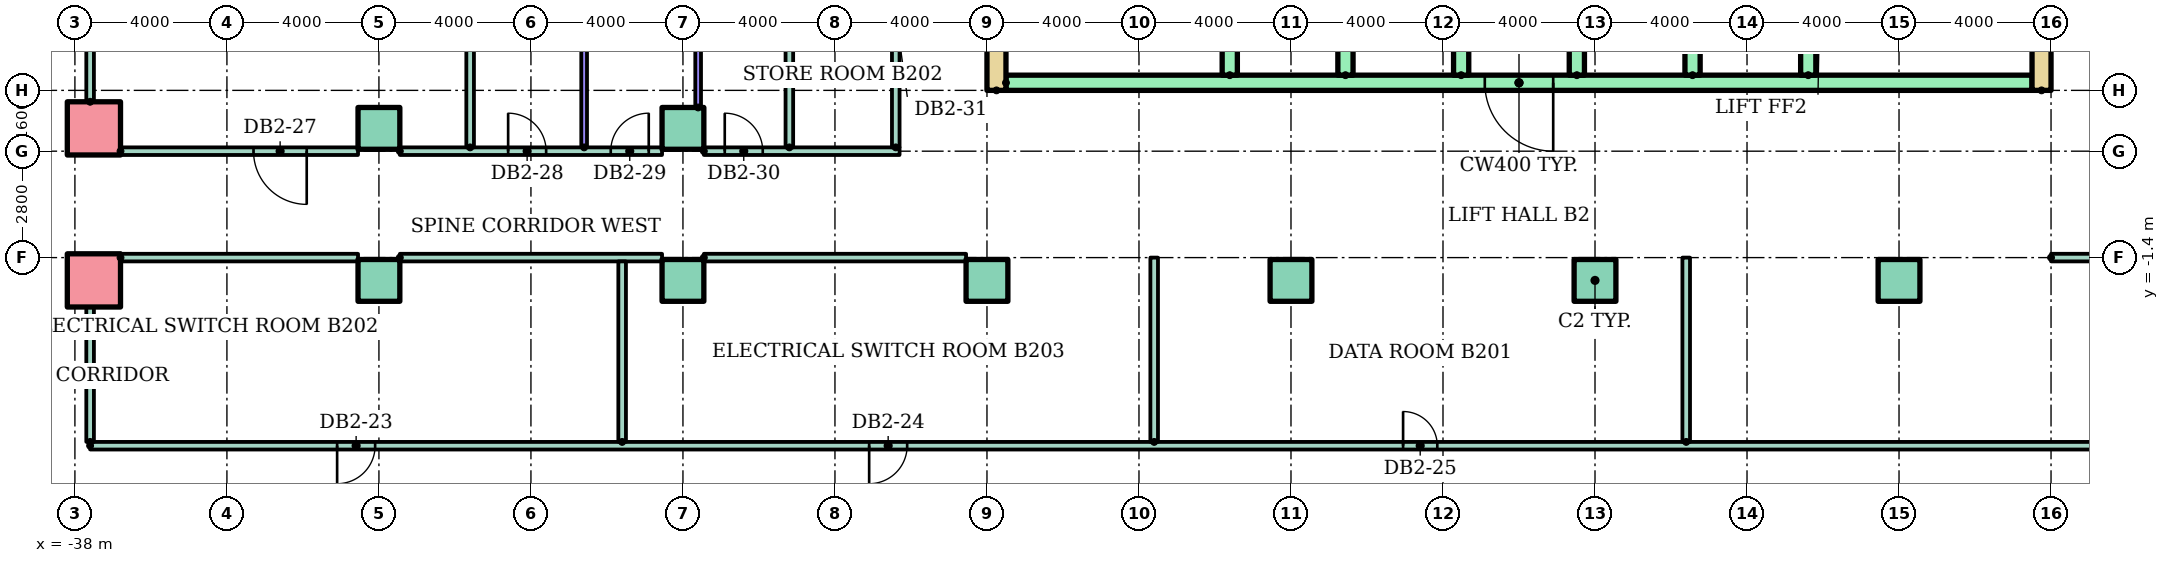
"""IFC4 building model, lengths in metres.
Left out: names, types, materials, properties, quantities, classifications, styles, units other than length and angle.
Written with IfcOpenShell. Run it as: python <this file> out.ifc"""

import sys

from ifc_helpers import new_model, si_unit, direction, frame, frame_2d, origin, origin_2d, place, context, subcontext, project, spatial, rectangle, hollow_rectangle, extrude, element, fill, save


model = new_model("IFC4")
c1 = context("Model", 3, precision=1e-05, world=origin(), true_north=direction((0.0, 1.0)))
c2 = subcontext(c1, "Body", "Model", "MODEL_VIEW")
j1 = project(units=[si_unit("LENGTHUNIT", "METRE"), si_unit("PLANEANGLEUNIT", "RADIAN")], contexts=[c1])
p1 = place(None, origin())
s1 = spatial("IfcSite", under=j1, at=p1, CompositionType="ELEMENT")
p2 = place(p1, origin())
s2 = spatial("IfcBuilding", under=s1, at=p2, CompositionType="ELEMENT")
p3 = place(p2, frame((0.0, 0.0, -10.0)))
s3 = spatial("IfcBuildingStorey", under=s2, at=p3, CompositionType="ELEMENT", Elevation=-10.0)
p4 = place(p3, frame((-37.5, -2.0, -0.3)))
e1 = element("IfcColumn", 1, at=p4, inside=s3, PredefinedType="COLUMN", context=c2, shape_type="SweptSolid", body=[
    extrude(hollow_rectangle(XDim=1.4, YDim=1.4, WallThickness=0.08, at=origin_2d()), origin(), (0.0, 0.0, 1.0), 5.3),
])
for number, where in (
    (2, (-30.0, -2.0, -0.3)),
    (3, (-22.0, -2.0, -0.3)),
    (4, (-14.0, -2.0, -0.3)),
    (5, (-6.0, -2.0, -0.3)),
    (6, (2.0, -2.0, -0.3)),
    (7, (10.0, -2.0, -0.3)),
):
    element("IfcColumn", number, at=place(p3, frame(where)), inside=s3, PredefinedType="COLUMN", context=c2, shape_type="SweptSolid", body=[
        extrude(rectangle(XDim=1.1, YDim=1.1, at=origin_2d()), origin(), (0.0, 0.0, 1.0), 5.3),
    ])
p5 = place(p3, frame((-37.5, 2.0, -0.3)))
e8 = element("IfcColumn", 8, at=p5, inside=s3, PredefinedType="COLUMN", context=c2, shape_type="SweptSolid", body=[
    extrude(hollow_rectangle(XDim=1.4, YDim=1.4, WallThickness=0.08, at=origin_2d()), origin(), (0.0, 0.0, 1.0), 5.3),
])
for number, where in (
    (9, (-30.0, 2.0, -0.3)),
    (10, (-22.0, 2.0, -0.3)),
):
    element("IfcColumn", number, at=place(p3, frame(where)), inside=s3, PredefinedType="COLUMN", context=c2, shape_type="SweptSolid", body=[
        extrude(rectangle(XDim=1.1, YDim=1.1, at=origin_2d()), origin(), (0.0, 0.0, 1.0), 5.3),
    ])
for number, where, z_axis, x_axis in (
    (11, (-13.75, 3.0, 0.0), (0.0, 0.0, 1.0), (0.0, 1.0, 0.0)),
    (12, (13.75, 3.0, 0.0), (0.0, 0.0, 1.0), (0.0, 1.0, 0.0)),
):
    element("IfcWall", number, at=place(p3, frame(where, z_axis=z_axis, x_axis=x_axis)), inside=s3, PredefinedType="SHEAR", context=c2, shape_type="SweptSolid", body=[
        extrude(rectangle(XDim=17.4, YDim=0.5, at=frame_2d((8.7, 0.0))), origin(), (0.0, 0.0, 1.0), 4.65),
    ])
p6 = place(p3, frame((-13.5, 3.2, 0.0)))
e13 = element("IfcWall", 13, at=p6, inside=s3, PredefinedType="SHEAR", context=c2, shape_type="SweptSolid", body=[
    extrude(rectangle(XDim=27.0, YDim=0.4, at=frame_2d((13.5, 0.0))), origin(), (0.0, 0.0, 1.0), 4.65),
])
p7 = place(p6, frame((12.6, 0.0, 0.0)))
e14 = element("IfcOpeningElement", 14, at=p7, cuts=e13, PredefinedType="OPENING", context=c2, shape_type="SweptSolid", body=[
    extrude(rectangle(XDim=1.8, YDim=2.1, at=frame_2d((0.9, 1.05))), frame((0.0, 0.21, 0.0), z_axis=(0.0, -1.0, 0.0), x_axis=(1.0, 0.0, 0.0)), (0.0, 0.0, 1.0), 0.42),
])
for number, where, z_axis, x_axis in (
    (15, (-7.611, 3.4, 0.0), (0.0, 0.0, 1.0), (0.0, 1.0, 0.0)),
    (16, (-4.567, 3.4, 0.0), (0.0, 0.0, 1.0), (0.0, 1.0, 0.0)),
    (17, (-1.522, 3.4, 0.0), (0.0, 0.0, 1.0), (0.0, 1.0, 0.0)),
    (18, (1.522, 3.4, 0.0), (0.0, 0.0, 1.0), (0.0, 1.0, 0.0)),
    (19, (4.567, 3.4, 0.0), (0.0, 0.0, 1.0), (0.0, 1.0, 0.0)),
    (20, (7.611, 3.4, 0.0), (0.0, 0.0, 1.0), (0.0, 1.0, 0.0)),
):
    element("IfcWall", number, at=place(p3, frame(where, z_axis=z_axis, x_axis=x_axis)), inside=s3, PredefinedType="SHEAR", context=c2, shape_type="SweptSolid", body=[
        extrude(rectangle(XDim=3.0, YDim=0.4, at=frame_2d((1.5, 0.0))), origin(), (0.0, 0.0, 1.0), 4.65),
    ])
p8 = place(p3, frame((-37.6, -6.35, 0.0)))
e21 = element("IfcWall", 21, at=p8, inside=s3, PredefinedType="PARTITIONING", context=c2, shape_type="SweptSolid", body=[
    extrude(rectangle(XDim=75.2, YDim=0.2, at=frame_2d((37.6, 0.0))), origin(), (0.0, 0.0, 1.0), 4.65),
])
p9 = place(p8, frame((6.5, 0.0, 0.0)))
e22 = element("IfcOpeningElement", 22, at=p9, cuts=e21, PredefinedType="OPENING", context=c2, shape_type="SweptSolid", body=[
    extrude(rectangle(XDim=1.0, YDim=2.1, at=frame_2d((0.5, 1.05))), frame((0.0, 0.11, 0.0), z_axis=(0.0, -1.0, 0.0), x_axis=(1.0, 0.0, 0.0)), (0.0, 0.0, 1.0), 0.22),
])
p10 = place(p8, frame((20.5, 0.0, 0.0)))
e23 = element("IfcOpeningElement", 23, at=p10, cuts=e21, PredefinedType="OPENING", context=c2, shape_type="SweptSolid", body=[
    extrude(rectangle(XDim=1.0, YDim=2.1, at=frame_2d((0.5, 1.05))), frame((0.0, 0.11, 0.0), z_axis=(0.0, -1.0, 0.0), x_axis=(1.0, 0.0, 0.0)), (0.0, 0.0, 1.0), 0.22),
])
p11 = place(p8, frame((34.55, 0.0, 0.0)))
e24 = element("IfcOpeningElement", 24, at=p11, cuts=e21, PredefinedType="OPENING", context=c2, shape_type="SweptSolid", body=[
    extrude(rectangle(XDim=0.9, YDim=2.1, at=frame_2d((0.45, 1.05))), frame((0.0, 0.11, 0.0), z_axis=(0.0, -1.0, 0.0), x_axis=(1.0, 0.0, 0.0)), (0.0, 0.0, 1.0), 0.22),
])
p12 = place(p8, frame((58.1, 0.0, 0.0)))
e25 = element("IfcOpeningElement", 25, at=p12, cuts=e21, PredefinedType="OPENING", context=c2, shape_type="SweptSolid", body=[
    extrude(rectangle(XDim=1.0, YDim=2.1, at=frame_2d((0.5, 1.05))), frame((0.0, 0.11, 0.0), z_axis=(0.0, -1.0, 0.0), x_axis=(1.0, 0.0, 0.0)), (0.0, 0.0, 1.0), 0.22),
])
p13 = place(p3, frame((-36.8, -1.4, 0.0)))
e26 = element("IfcWall", 26, at=p13, inside=s3, PredefinedType="PARTITIONING", context=c2, shape_type="SweptSolid", body=[
    extrude(rectangle(XDim=6.25, YDim=0.2, at=frame_2d((3.125, 0.0))), origin(), (0.0, 0.0, 1.0), 4.65),
])
for number, where in (
    (27, (-29.45, -1.4, 0.0)),
    (28, (-21.45, -1.4, 0.0)),
):
    element("IfcWall", number, at=place(p3, frame(where)), inside=s3, PredefinedType="PARTITIONING", context=c2, shape_type="SweptSolid", body=[
        extrude(rectangle(XDim=6.9, YDim=0.2, at=frame_2d((3.45, 0.0))), origin(), (0.0, 0.0, 1.0), 4.65),
    ])
p14 = place(p3, frame((14.0, -1.4, 0.0)))
e29 = element("IfcWall", 29, at=p14, inside=s3, PredefinedType="PARTITIONING", context=c2, shape_type="SweptSolid", body=[
    extrude(rectangle(XDim=3.45, YDim=0.2, at=frame_2d((1.725, 0.0))), origin(), (0.0, 0.0, 1.0), 4.65),
])
p15 = place(p3, frame((-36.8, 1.4, 0.0)))
e30 = element("IfcWall", 30, at=p15, inside=s3, PredefinedType="PARTITIONING", context=c2, shape_type="SweptSolid", body=[
    extrude(rectangle(XDim=6.25, YDim=0.2, at=frame_2d((3.125, 0.0))), origin(), (0.0, 0.0, 1.0), 4.65),
])
p16 = place(p15, frame((3.5, 0.0, 0.0)))
e31 = element("IfcOpeningElement", 31, at=p16, cuts=e30, PredefinedType="OPENING", context=c2, shape_type="SweptSolid", body=[
    extrude(rectangle(XDim=1.4, YDim=2.1, at=frame_2d((0.7, 1.05))), frame((0.0, 0.11, 0.0), z_axis=(0.0, -1.0, 0.0), x_axis=(1.0, 0.0, 0.0)), (0.0, 0.0, 1.0), 0.22),
])
p17 = place(p3, frame((-29.45, 1.4, 0.0)))
e32 = element("IfcWall", 32, at=p17, inside=s3, PredefinedType="PARTITIONING", context=c2, shape_type="SweptSolid", body=[
    extrude(rectangle(XDim=6.9, YDim=0.2, at=frame_2d((3.45, 0.0))), origin(), (0.0, 0.0, 1.0), 4.65),
])
p18 = place(p17, frame((2.85, 0.0, 0.0)))
e33 = element("IfcOpeningElement", 33, at=p18, cuts=e32, PredefinedType="OPENING", context=c2, shape_type="SweptSolid", body=[
    extrude(rectangle(XDim=1.0, YDim=2.1, at=frame_2d((0.5, 1.05))), frame((0.0, 0.11, 0.0), z_axis=(0.0, -1.0, 0.0), x_axis=(1.0, 0.0, 0.0)), (0.0, 0.0, 1.0), 0.22),
])
p19 = place(p17, frame((5.55, 0.0, 0.0)))
e34 = element("IfcOpeningElement", 34, at=p19, cuts=e32, PredefinedType="OPENING", context=c2, shape_type="SweptSolid", body=[
    extrude(rectangle(XDim=1.0, YDim=2.1, at=frame_2d((0.5, 1.05))), frame((0.0, 0.11, 0.0), z_axis=(0.0, -1.0, 0.0), x_axis=(1.0, 0.0, 0.0)), (0.0, 0.0, 1.0), 0.22),
])
p20 = place(p3, frame((-21.45, 1.4, 0.0)))
e35 = element("IfcWall", 35, at=p20, inside=s3, PredefinedType="PARTITIONING", context=c2, shape_type="SweptSolid", body=[
    extrude(rectangle(XDim=5.15, YDim=0.2, at=frame_2d((2.575, 0.0))), origin(), (0.0, 0.0, 1.0), 4.65),
])
p21 = place(p20, frame((0.55, 0.0, 0.0)))
e36 = element("IfcOpeningElement", 36, at=p21, cuts=e35, PredefinedType="OPENING", context=c2, shape_type="SweptSolid", body=[
    extrude(rectangle(XDim=1.0, YDim=2.1, at=frame_2d((0.5, 1.05))), frame((0.0, 0.11, 0.0), z_axis=(0.0, -1.0, 0.0), x_axis=(1.0, 0.0, 0.0)), (0.0, 0.0, 1.0), 0.22),
])
p22 = place(p3, frame((-37.6, -6.25, 0.0), z_axis=(0.0, 0.0, 1.0), x_axis=(0.0, 1.0, 0.0)))
e37 = element("IfcWall", 37, at=p22, inside=s3, PredefinedType="PARTITIONING", context=c2, shape_type="SweptSolid", body=[
    extrude(rectangle(XDim=3.55, YDim=0.2, at=frame_2d((1.775, 0.0))), origin(), (0.0, 0.0, 1.0), 4.65),
])
p23 = place(p3, frame((-37.6, 2.7, 0.0), z_axis=(0.0, 0.0, 1.0), x_axis=(0.0, 1.0, 0.0)))
e38 = element("IfcWall", 38, at=p23, inside=s3, PredefinedType="PARTITIONING", context=c2, shape_type="SweptSolid", body=[
    extrude(rectangle(XDim=5.8, YDim=0.2, at=frame_2d((2.9, 0.0))), origin(), (0.0, 0.0, 1.0), 4.65),
])
p24 = place(p3, frame((-27.6, 1.5, 0.0), z_axis=(0.0, 0.0, 1.0), x_axis=(0.0, 1.0, 0.0)))
e39 = element("IfcWall", 39, at=p24, inside=s3, PredefinedType="PARTITIONING", context=c2, shape_type="SweptSolid", body=[
    extrude(rectangle(XDim=7.0, YDim=0.2, at=frame_2d((3.5, 0.0))), origin(), (0.0, 0.0, 1.0), 4.65),
])
p25 = place(p3, frame((-24.6, 1.5, 0.0), z_axis=(0.0, 0.0, 1.0), x_axis=(0.0, 1.0, 0.0)))
e40 = element("IfcWall", 40, at=p25, inside=s3, PredefinedType="PARTITIONING", context=c2, shape_type="SweptSolid", body=[
    extrude(rectangle(XDim=7.0, YDim=0.15, at=frame_2d((3.5, 0.0))), origin(), (0.0, 0.0, 1.0), 4.65),
])
p26 = place(p3, frame((-23.6, -6.25, 0.0), z_axis=(0.0, 0.0, 1.0), x_axis=(0.0, 1.0, 0.0)))
e41 = element("IfcWall", 41, at=p26, inside=s3, PredefinedType="PARTITIONING", context=c2, shape_type="SweptSolid", body=[
    extrude(rectangle(XDim=4.75, YDim=0.2, at=frame_2d((2.375, 0.0))), origin(), (0.0, 0.0, 1.0), 4.65),
])
p27 = place(p3, frame((-21.6, 2.55, 0.0), z_axis=(0.0, 0.0, 1.0), x_axis=(0.0, 1.0, 0.0)))
e42 = element("IfcWall", 42, at=p27, inside=s3, PredefinedType="PARTITIONING", context=c2, shape_type="SweptSolid", body=[
    extrude(rectangle(XDim=5.95, YDim=0.15, at=frame_2d((2.975, 0.0))), origin(), (0.0, 0.0, 1.0), 4.65),
])
p28 = place(p3, frame((-19.2, 1.5, 0.0), z_axis=(0.0, 0.0, 1.0), x_axis=(0.0, 1.0, 0.0)))
e43 = element("IfcWall", 43, at=p28, inside=s3, PredefinedType="PARTITIONING", context=c2, shape_type="SweptSolid", body=[
    extrude(rectangle(XDim=7.0, YDim=0.2, at=frame_2d((3.5, 0.0))), origin(), (0.0, 0.0, 1.0), 4.65),
])
p29 = place(p3, frame((-16.4, 1.5, 0.0), z_axis=(0.0, 0.0, 1.0), x_axis=(0.0, 1.0, 0.0)))
e44 = element("IfcWall", 44, at=p29, inside=s3, PredefinedType="PARTITIONING", context=c2, shape_type="SweptSolid", body=[
    extrude(rectangle(XDim=7.0, YDim=0.2, at=frame_2d((3.5, 0.0))), origin(), (0.0, 0.0, 1.0), 4.65),
])
p30 = place(p29, frame((3.05, 0.0, 0.0)))
e45 = element("IfcOpeningElement", 45, at=p30, cuts=e44, PredefinedType="OPENING", context=c2, shape_type="SweptSolid", body=[
    extrude(rectangle(XDim=0.9, YDim=2.1, at=frame_2d((0.45, 1.05))), frame((0.0, 0.11, 0.0), z_axis=(0.0, -1.0, 0.0), x_axis=(1.0, 0.0, 0.0)), (0.0, 0.0, 1.0), 0.22),
])
for number, where, z_axis, x_axis in (
    (46, (-9.6, -6.25, 0.0), (0.0, 0.0, 1.0), (0.0, 1.0, 0.0)),
    (47, (4.4, -6.25, 0.0), (0.0, 0.0, 1.0), (0.0, 1.0, 0.0)),
):
    element("IfcWall", number, at=place(p3, frame(where, z_axis=z_axis, x_axis=x_axis)), inside=s3, PredefinedType="PARTITIONING", context=c2, shape_type="SweptSolid", body=[
        extrude(rectangle(XDim=4.85, YDim=0.2, at=frame_2d((2.425, 0.0))), origin(), (0.0, 0.0, 1.0), 4.65),
    ])
p31 = place(p7, frame((1.8, 0.0, 0.0), z_axis=(0.0, 0.0, 1.0), x_axis=(-1.0, 0.0, 0.0)))
e48 = element("IfcDoor", 48, at=p31, inside=s3, OperationType="DOUBLE_DOOR_SINGLE_SWING", PredefinedType="DOOR", context=c2, shape_type="SweptSolid", body=[
    extrude(rectangle(XDim=1.8, YDim=2.1, at=frame_2d((0.9, 1.05))), frame((0.0, 0.025, 0.0), z_axis=(0.0, -1.0, 0.0), x_axis=(1.0, 0.0, 0.0)), (0.0, 0.0, 1.0), 0.05),
])
fill(e14, e48)
p32 = place(p9, frame((1.0, 0.0, 0.0), z_axis=(0.0, 0.0, 1.0), x_axis=(-1.0, 0.0, 0.0)))
e49 = element("IfcDoor", 49, at=p32, inside=s3, OperationType="SINGLE_SWING_LEFT", PredefinedType="DOOR", context=c2, shape_type="SweptSolid", body=[
    extrude(rectangle(XDim=1.0, YDim=2.1, at=frame_2d((0.5, 1.05))), frame((0.0, 0.025, 0.0), z_axis=(0.0, -1.0, 0.0), x_axis=(1.0, 0.0, 0.0)), (0.0, 0.0, 1.0), 0.05),
])
fill(e22, e49)
p33 = place(p10, frame((1.0, 0.0, 0.0), z_axis=(0.0, 0.0, 1.0), x_axis=(-1.0, 0.0, 0.0)))
e50 = element("IfcDoor", 50, at=p33, inside=s3, OperationType="SINGLE_SWING_LEFT", PredefinedType="DOOR", context=c2, shape_type="SweptSolid", body=[
    extrude(rectangle(XDim=1.0, YDim=2.1, at=frame_2d((0.5, 1.05))), frame((0.0, 0.025, 0.0), z_axis=(0.0, -1.0, 0.0), x_axis=(1.0, 0.0, 0.0)), (0.0, 0.0, 1.0), 0.05),
])
fill(e23, e50)
p34 = place(p11, origin())
e51 = element("IfcDoor", 51, at=p34, inside=s3, OperationType="SINGLE_SWING_LEFT", PredefinedType="DOOR", context=c2, shape_type="SweptSolid", body=[
    extrude(rectangle(XDim=0.9, YDim=2.1, at=frame_2d((0.45, 1.05))), frame((0.0, 0.025, 0.0), z_axis=(0.0, -1.0, 0.0), x_axis=(1.0, 0.0, 0.0)), (0.0, 0.0, 1.0), 0.05),
])
fill(e24, e51)
p35 = place(p16, frame((1.4, 0.0, 0.0), z_axis=(0.0, 0.0, 1.0), x_axis=(-1.0, 0.0, 0.0)))
e52 = element("IfcDoor", 52, at=p35, inside=s3, OperationType="DOUBLE_DOOR_SINGLE_SWING", PredefinedType="DOOR", context=c2, shape_type="SweptSolid", body=[
    extrude(rectangle(XDim=1.4, YDim=2.1, at=frame_2d((0.7, 1.05))), frame((0.0, 0.025, 0.0), z_axis=(0.0, -1.0, 0.0), x_axis=(1.0, 0.0, 0.0)), (0.0, 0.0, 1.0), 0.05),
])
fill(e31, e52)
p36 = place(p18, origin())
e53 = element("IfcDoor", 53, at=p36, inside=s3, OperationType="SINGLE_SWING_LEFT", PredefinedType="DOOR", context=c2, shape_type="SweptSolid", body=[
    extrude(rectangle(XDim=1.0, YDim=2.1, at=frame_2d((0.5, 1.05))), frame((0.0, 0.025, 0.0), z_axis=(0.0, -1.0, 0.0), x_axis=(1.0, 0.0, 0.0)), (0.0, 0.0, 1.0), 0.05),
])
fill(e33, e53)
p37 = place(p19, origin())
e54 = element("IfcDoor", 54, at=p37, inside=s3, OperationType="SINGLE_SWING_RIGHT", PredefinedType="DOOR", context=c2, shape_type="SweptSolid", body=[
    extrude(rectangle(XDim=1.0, YDim=2.1, at=frame_2d((0.5, 1.05))), frame((0.0, 0.025, 0.0), z_axis=(0.0, -1.0, 0.0), x_axis=(1.0, 0.0, 0.0)), (0.0, 0.0, 1.0), 0.05),
])
fill(e34, e54)
p38 = place(p21, origin())
e55 = element("IfcDoor", 55, at=p38, inside=s3, OperationType="SINGLE_SWING_LEFT", PredefinedType="DOOR", context=c2, shape_type="SweptSolid", body=[
    extrude(rectangle(XDim=1.0, YDim=2.1, at=frame_2d((0.5, 1.05))), frame((0.0, 0.025, 0.0), z_axis=(0.0, -1.0, 0.0), x_axis=(1.0, 0.0, 0.0)), (0.0, 0.0, 1.0), 0.05),
])
fill(e36, e55)
save(model, sys.argv[1])
